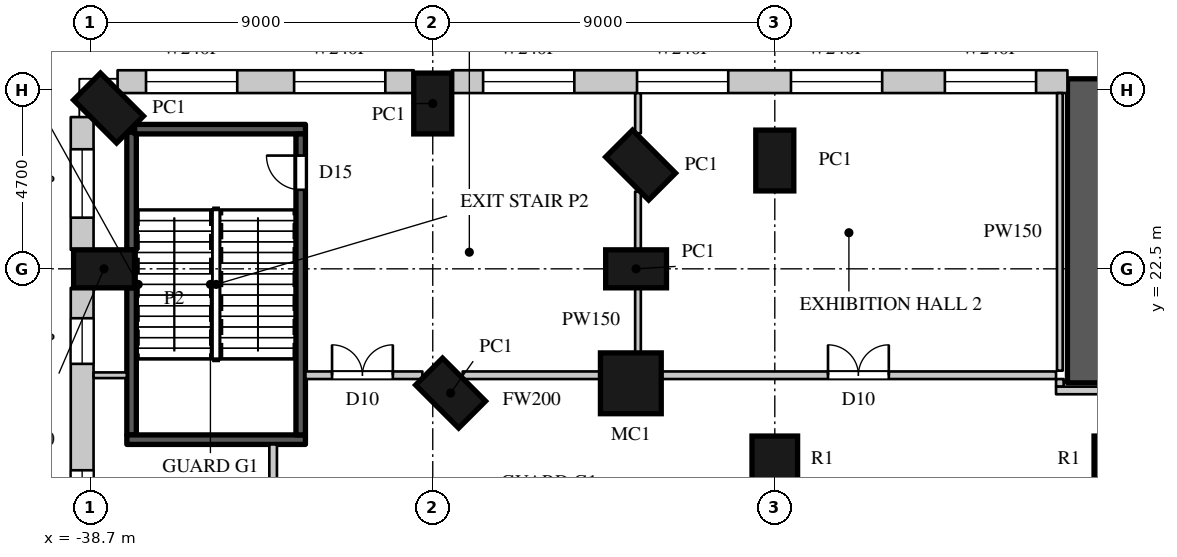
"""IFC4 building model, lengths in metres.
Left out: names, types, materials, properties, quantities, classifications, styles, units other than length and angle.
Written with IfcOpenShell. Run it as: python <this file> out.ifc"""

import sys

from ifc_helpers import new_model, si_unit, direction, frame, frame_2d, origin, origin_2d, place, context, subcontext, project, spatial, rectangle, circle, extrude, element, fill, save


model = new_model("IFC4")
c1 = context("Model", 3, precision=1e-05, world=origin(), true_north=direction((0.0, 1.0)))
c2 = subcontext(c1, "Body", "Model", "MODEL_VIEW")
j1 = project(units=[si_unit("LENGTHUNIT", "METRE"), si_unit("PLANEANGLEUNIT", "RADIAN")], contexts=[c1])
p1 = place(None, origin())
s1 = spatial("IfcSite", under=j1, at=p1, CompositionType="ELEMENT")
p2 = place(p1, origin())
s2 = spatial("IfcBuilding", under=s1, at=p2, CompositionType="ELEMENT")
p3 = place(p2, frame((0.0, 0.0, 9.0)))
s3 = spatial("IfcBuildingStorey", under=s2, at=p3, CompositionType="ELEMENT", Elevation=9.0)
p4 = place(p3, frame((-11.5, 19.5, 0.0), z_axis=(0.0, 0.0, 1.0), x_axis=(0.0, 1.0, 0.0)))
e1 = element("IfcWall", 1, at=p4, inside=s3, PredefinedType="SOLIDWALL", context=c2, shape_type="SweptSolid", body=[
    extrude(rectangle(XDim=8.0, YDim=3.0, at=frame_2d((4.0, 0.0))), origin(), (0.0, 0.0, 1.0), 10.0),
])
for number, where, z_axis, x_axis in (
    (2, (-29.231, 19.231, 0.0), (0.0, 0.0, 1.0), (-0.707, -0.707, 0.0)),
    (3, (-20.7, 25.35, 0.0), (0.0, 0.0, 1.0), (-1.0, 0.0, 0.0)),
    (4, (-24.231, 25.231, 0.0), (0.0, 0.0, 1.0), (-0.707, -0.707, 0.0)),
    (5, (-24.35, 22.5, 0.0), (0.0, 0.0, 1.0), (0.0, -1.0, 0.0)),
):
    element("IfcColumn", number, at=place(p3, frame(where, z_axis=z_axis, x_axis=x_axis)), inside=s3, PredefinedType="COLUMN", context=c2, shape_type="SweptSolid", body=[
        extrude(rectangle(XDim=1.0, YDim=1.6, at=origin_2d()), origin(), (0.0, 0.0, 1.0), 10.0),
    ])
p5 = place(p3, frame((-24.488, 19.488, 0.0), z_axis=(0.0, 0.0, 1.0), x_axis=(1.0, 0.0, 0.0)))
e6 = element("IfcColumn", 6, at=p5, inside=s3, PredefinedType="COLUMN", context=c2, shape_type="SweptSolid", body=[
    extrude(circle(Radius=0.8, at=origin_2d()), origin(), (0.0, 0.0, 1.0), 10.0),
])
for number, where, z_axis, x_axis in (
    (7, (-29.7, 26.85, 0.0), (0.0, 0.0, 1.0), (-1.0, 0.0, 0.0)),
    (8, (-38.231, 26.731, 0.0), (0.0, 0.0, 1.0), (-0.707, -0.707, 0.0)),
    (9, (-38.35, 22.5, 0.0), (0.0, 0.0, 1.0), (0.0, -1.0, 0.0)),
):
    element("IfcColumn", number, at=place(p3, frame(where, z_axis=z_axis, x_axis=x_axis)), inside=s3, PredefinedType="COLUMN", context=c2, shape_type="SweptSolid", body=[
        extrude(rectangle(XDim=1.0, YDim=1.6, at=origin_2d()), origin(), (0.0, 0.0, 1.0), 10.0),
    ])
for number, where, z_axis, x_axis in (
    (10, (-20.7, 17.5, 0.0), (0.0, 0.0, 1.0), (1.0, 0.0, 0.0)),
    (11, (-11.7, 17.5, 0.0), (0.0, 0.0, 1.0), (1.0, 0.0, 0.0)),
):
    element("IfcColumn", number, at=place(p3, frame(where, z_axis=z_axis, x_axis=x_axis)), inside=s3, PredefinedType="COLUMN", context=c2, shape_type="SweptSolid", body=[
        extrude(circle(Radius=0.6, at=origin_2d()), origin(), (0.0, 0.0, 1.0), 10.0),
    ])
p6 = place(p3, frame((-13.0, 27.425, 0.0), z_axis=(0.0, 0.0, 1.0), x_axis=(-1.0, 0.0, 0.0)))
e12 = element("IfcWall", 12, at=p6, inside=s3, PredefinedType="ELEMENTEDWALL", context=c2, shape_type="SweptSolid", body=[
    extrude(rectangle(XDim=16.2, YDim=0.6, at=frame_2d((8.1, 0.0))), origin(), (0.0, 0.0, 1.0), 9.6),
])
p7 = place(p6, frame((0.825, 0.0, 3.0)))
e13 = element("IfcOpeningElement", 13, at=p7, cuts=e12, PredefinedType="OPENING", context=c2, shape_type="SweptSolid", body=[
    extrude(rectangle(XDim=2.4, YDim=2.4, at=frame_2d((1.2, 1.2))), frame((0.0, 0.31, 0.0), z_axis=(0.0, -1.0, 0.0), x_axis=(1.0, 0.0, 0.0)), (0.0, 0.0, 1.0), 0.62),
])
p8 = place(p6, frame((4.875, 0.0, 3.0)))
e14 = element("IfcOpeningElement", 14, at=p8, cuts=e12, PredefinedType="OPENING", context=c2, shape_type="SweptSolid", body=[
    extrude(rectangle(XDim=2.4, YDim=2.4, at=frame_2d((1.2, 1.2))), frame((0.0, 0.31, 0.0), z_axis=(0.0, -1.0, 0.0), x_axis=(1.0, 0.0, 0.0)), (0.0, 0.0, 1.0), 0.62),
])
p9 = place(p6, frame((8.925, 0.0, 3.0)))
e15 = element("IfcOpeningElement", 15, at=p9, cuts=e12, PredefinedType="OPENING", context=c2, shape_type="SweptSolid", body=[
    extrude(rectangle(XDim=2.4, YDim=2.4, at=frame_2d((1.2, 1.2))), frame((0.0, 0.31, 0.0), z_axis=(0.0, -1.0, 0.0), x_axis=(1.0, 0.0, 0.0)), (0.0, 0.0, 1.0), 0.62),
])
p10 = place(p6, frame((12.975, 0.0, 3.0)))
e16 = element("IfcOpeningElement", 16, at=p10, cuts=e12, PredefinedType="OPENING", context=c2, shape_type="SweptSolid", body=[
    extrude(rectangle(XDim=2.4, YDim=2.4, at=frame_2d((1.2, 1.2))), frame((0.0, 0.31, 0.0), z_axis=(0.0, -1.0, 0.0), x_axis=(1.0, 0.0, 0.0)), (0.0, 0.0, 1.0), 0.62),
])
p11 = place(p3, frame((-30.2, 27.425, 0.0), z_axis=(0.0, 0.0, 1.0), x_axis=(-1.0, 0.0, 0.0)))
e17 = element("IfcWall", 17, at=p11, inside=s3, PredefinedType="ELEMENTEDWALL", context=c2, shape_type="SweptSolid", body=[
    extrude(rectangle(XDim=7.793, YDim=0.6, at=frame_2d((3.896, 0.0))), origin(), (0.0, 0.0, 1.0), 9.6),
])
p12 = place(p11, frame((0.748, 0.0, 3.0)))
e18 = element("IfcOpeningElement", 18, at=p12, cuts=e17, PredefinedType="OPENING", context=c2, shape_type="SweptSolid", body=[
    extrude(rectangle(XDim=2.4, YDim=2.4, at=frame_2d((1.2, 1.2))), frame((0.0, 0.31, 0.0), z_axis=(0.0, -1.0, 0.0), x_axis=(1.0, 0.0, 0.0)), (0.0, 0.0, 1.0), 0.62),
])
p13 = place(p11, frame((4.645, 0.0, 3.0)))
e19 = element("IfcOpeningElement", 19, at=p13, cuts=e17, PredefinedType="OPENING", context=c2, shape_type="SweptSolid", body=[
    extrude(rectangle(XDim=2.4, YDim=2.4, at=frame_2d((1.2, 1.2))), frame((0.0, 0.31, 0.0), z_axis=(0.0, -1.0, 0.0), x_axis=(1.0, 0.0, 0.0)), (0.0, 0.0, 1.0), 0.62),
])
p14 = place(p3, frame((-38.925, 26.493, 0.0), z_axis=(0.0, 0.0, 1.0), x_axis=(0.0, -1.0, 0.0)))
e20 = element("IfcWall", 20, at=p14, inside=s3, PredefinedType="ELEMENTEDWALL", context=c2, shape_type="SweptSolid", body=[
    extrude(rectangle(XDim=3.493, YDim=0.6, at=frame_2d((1.747, 0.0))), origin(), (0.0, 0.0, 1.0), 9.6),
])
p15 = place(p14, frame((0.846, 0.0, 3.0)))
e21 = element("IfcOpeningElement", 21, at=p15, cuts=e20, PredefinedType="OPENING", context=c2, shape_type="SweptSolid", body=[
    extrude(rectangle(XDim=1.8, YDim=2.4, at=frame_2d((0.9, 1.2))), frame((0.0, 0.31, 0.0), z_axis=(0.0, -1.0, 0.0), x_axis=(1.0, 0.0, 0.0)), (0.0, 0.0, 1.0), 0.62),
])
p16 = place(p3, frame((-38.925, 22.0, 0.0), z_axis=(0.0, 0.0, 1.0), x_axis=(0.0, -1.0, 0.0)))
e22 = element("IfcWall", 22, at=p16, inside=s3, PredefinedType="ELEMENTEDWALL", context=c2, shape_type="SweptSolid", body=[
    extrude(rectangle(XDim=8.0, YDim=0.6, at=frame_2d((4.0, 0.0))), origin(), (0.0, 0.0, 1.0), 9.6),
])
p17 = place(p16, frame((4.8, 0.0, 3.0)))
e23 = element("IfcOpeningElement", 23, at=p17, cuts=e22, PredefinedType="OPENING", context=c2, shape_type="SweptSolid", body=[
    extrude(rectangle(XDim=2.4, YDim=2.4, at=frame_2d((1.2, 1.2))), frame((0.0, 0.31, 0.0), z_axis=(0.0, -1.0, 0.0), x_axis=(1.0, 0.0, 0.0)), (0.0, 0.0, 1.0), 0.62),
])
p18 = place(p16, frame((0.8, 0.0, 3.0)))
e24 = element("IfcOpeningElement", 24, at=p18, cuts=e22, PredefinedType="OPENING", context=c2, shape_type="SweptSolid", body=[
    extrude(rectangle(XDim=1.2, YDim=2.4, at=frame_2d((0.6, 1.2))), frame((0.0, 0.31, 0.0), z_axis=(0.0, -1.0, 0.0), x_axis=(1.0, 0.0, 0.0)), (0.0, 0.0, 1.0), 0.62),
])
p19 = place(p3, frame((-33.9, -17.88, 0.0), z_axis=(0.0, 0.0, 1.0), x_axis=(0.0, 1.0, 0.0)))
e25 = element("IfcWall", 25, at=p19, inside=s3, PredefinedType="PARTITIONING", context=c2, shape_type="SweptSolid", body=[
    extrude(rectangle(XDim=35.76, YDim=0.2, at=frame_2d((17.88, 0.0))), origin(), (0.0, 0.0, 1.0), 9.598),
])
p20 = place(p19, frame((1.3, 0.0, 0.0)))
e26 = element("IfcOpeningElement", 26, at=p20, cuts=e25, PredefinedType="OPENING", context=c2, shape_type="SweptSolid", body=[
    extrude(rectangle(XDim=0.9, YDim=2.2, at=frame_2d((0.45, 1.1))), frame((0.0, 0.11, 0.0), z_axis=(0.0, -1.0, 0.0), x_axis=(1.0, 0.0, 0.0)), (0.0, 0.0, 1.0), 0.22),
])
p21 = place(p19, frame((5.4, 0.0, 0.0)))
e27 = element("IfcOpeningElement", 27, at=p21, cuts=e25, PredefinedType="OPENING", context=c2, shape_type="SweptSolid", body=[
    extrude(rectangle(XDim=0.9, YDim=2.2, at=frame_2d((0.45, 1.1))), frame((0.0, 0.11, 0.0), z_axis=(0.0, -1.0, 0.0), x_axis=(1.0, 0.0, 0.0)), (0.0, 0.0, 1.0), 0.22),
])
p22 = place(p19, frame((9.65, 0.0, 0.0)))
e28 = element("IfcOpeningElement", 28, at=p22, cuts=e25, PredefinedType="OPENING", context=c2, shape_type="SweptSolid", body=[
    extrude(rectangle(XDim=0.9, YDim=2.2, at=frame_2d((0.45, 1.1))), frame((0.0, 0.11, 0.0), z_axis=(0.0, -1.0, 0.0), x_axis=(1.0, 0.0, 0.0)), (0.0, 0.0, 1.0), 0.22),
])
p23 = place(p19, frame((18.4, 0.0, 0.0)))
e29 = element("IfcOpeningElement", 29, at=p23, cuts=e25, PredefinedType="OPENING", context=c2, shape_type="SweptSolid", body=[
    extrude(rectangle(XDim=0.95, YDim=2.2, at=frame_2d((0.475, 1.1))), frame((0.0, 0.11, 0.0), z_axis=(0.0, -1.0, 0.0), x_axis=(1.0, 0.0, 0.0)), (0.0, 0.0, 1.0), 0.22),
])
p24 = place(p19, frame((28.15, 0.0, 0.0)))
e30 = element("IfcOpeningElement", 30, at=p24, cuts=e25, PredefinedType="OPENING", context=c2, shape_type="SweptSolid", body=[
    extrude(rectangle(XDim=0.95, YDim=2.2, at=frame_2d((0.475, 1.1))), frame((0.0, 0.11, 0.0), z_axis=(0.0, -1.0, 0.0), x_axis=(1.0, 0.0, 0.0)), (0.0, 0.0, 1.0), 0.22),
])
p25 = place(p19, frame((33.0, 0.0, 0.0)))
e31 = element("IfcOpeningElement", 31, at=p25, cuts=e25, PredefinedType="OPENING", context=c2, shape_type="SweptSolid", body=[
    extrude(rectangle(XDim=0.95, YDim=2.2, at=frame_2d((0.475, 1.1))), frame((0.0, 0.11, 0.0), z_axis=(0.0, -1.0, 0.0), x_axis=(1.0, 0.0, 0.0)), (0.0, 0.0, 1.0), 0.22),
])
p26 = place(p3, frame((-33.05, 19.7, 0.0), z_axis=(0.0, 0.0, 1.0), x_axis=(1.0, 0.0, 0.0)))
e32 = element("IfcWall", 32, at=p26, inside=s3, PredefinedType="PARTITIONING", context=c2, shape_type="SweptSolid", body=[
    extrude(rectangle(XDim=3.077, YDim=0.2, at=frame_2d((1.539, 0.0))), origin(), (0.0, 0.0, 1.0), 9.598),
])
p27 = place(p26, frame((0.7, 0.0, 0.0)))
e33 = element("IfcOpeningElement", 33, at=p27, cuts=e32, PredefinedType="OPENING", context=c2, shape_type="SweptSolid", body=[
    extrude(rectangle(XDim=1.6, YDim=2.4, at=frame_2d((0.8, 1.2))), frame((0.0, 0.11, 0.0), z_axis=(0.0, -1.0, 0.0), x_axis=(1.0, 0.0, 0.0)), (0.0, 0.0, 1.0), 0.22),
])
p28 = place(p3, frame((-28.913, 19.7, 0.0), z_axis=(0.0, 0.0, 1.0), x_axis=(1.0, 0.0, 0.0)))
e34 = element("IfcWall", 34, at=p28, inside=s3, PredefinedType="PARTITIONING", context=c2, shape_type="SweptSolid", body=[
    extrude(rectangle(XDim=3.637, YDim=0.2, at=frame_2d((1.819, 0.0))), origin(), (0.0, 0.0, 1.0), 9.598),
])
p29 = place(p3, frame((-23.7, 19.7, 0.0), z_axis=(0.0, 0.0, 1.0), x_axis=(1.0, 0.0, 0.0)))
e35 = element("IfcWall", 35, at=p29, inside=s3, PredefinedType="PARTITIONING", context=c2, shape_type="SweptSolid", body=[
    extrude(rectangle(XDim=10.4, YDim=0.2, at=frame_2d((5.2, 0.0))), origin(), (0.0, 0.0, 1.0), 9.598),
])
p30 = place(p29, frame((4.4, 0.0, 0.0)))
e36 = element("IfcOpeningElement", 36, at=p30, cuts=e35, PredefinedType="OPENING", context=c2, shape_type="SweptSolid", body=[
    extrude(rectangle(XDim=1.6, YDim=2.4, at=frame_2d((0.8, 1.2))), frame((0.0, 0.11, 0.0), z_axis=(0.0, -1.0, 0.0), x_axis=(1.0, 0.0, 0.0)), (0.0, 0.0, 1.0), 0.22),
])
p31 = place(p3, frame((-13.2, 19.4, 0.0), z_axis=(0.0, 0.0, 1.0), x_axis=(0.0, 1.0, 0.0)))
e37 = element("IfcWall", 37, at=p31, inside=s3, PredefinedType="PARTITIONING", context=c2, shape_type="SweptSolid", body=[
    extrude(rectangle(XDim=0.2, YDim=0.2, at=frame_2d((0.1, 0.0))), origin(), (0.0, 0.0, 1.0), 9.598),
])
p32 = place(p3, frame((-13.3, 19.3, 0.0), z_axis=(0.0, 0.0, 1.0), x_axis=(1.0, 0.0, 0.0)))
e38 = element("IfcWall", 38, at=p32, inside=s3, PredefinedType="PARTITIONING", context=c2, shape_type="SweptSolid", body=[
    extrude(rectangle(XDim=2.8, YDim=0.2, at=frame_2d((1.4, 0.0))), origin(), (0.0, 0.0, 1.0), 9.598),
])
p33 = place(p3, frame((-38.625, 19.7, 0.0), z_axis=(0.0, 0.0, 1.0), x_axis=(1.0, 0.0, 0.0)))
e39 = element("IfcWall", 39, at=p33, inside=s3, PredefinedType="PARTITIONING", context=c2, shape_type="SweptSolid", body=[
    extrude(rectangle(XDim=0.875, YDim=0.15, at=frame_2d((0.438, 0.0))), origin(), (0.0, 0.0, 1.0), 9.598),
])
p34 = place(p3, frame((-24.3, 20.273, 0.0), z_axis=(0.0, 0.0, 1.0), x_axis=(0.0, 1.0, 0.0)))
e40 = element("IfcWall", 40, at=p34, inside=s3, PredefinedType="PARTITIONING", context=c2, shape_type="SweptSolid", body=[
    extrude(rectangle(XDim=1.727, YDim=0.15, at=frame_2d((0.864, 0.0))), origin(), (0.0, 0.0, 1.0), 9.598),
])
p35 = place(p3, frame((-24.3, 23.0, 0.0), z_axis=(0.0, 0.0, 1.0), x_axis=(0.0, 1.0, 0.0)))
e41 = element("IfcWall", 41, at=p35, inside=s3, PredefinedType="PARTITIONING", context=c2, shape_type="SweptSolid", body=[
    extrude(rectangle(XDim=1.533, YDim=0.15, at=frame_2d((0.767, 0.0))), origin(), (0.0, 0.0, 1.0), 9.598),
])
p36 = place(p3, frame((-24.3, 26.067, 0.0), z_axis=(0.0, 0.0, 1.0), x_axis=(0.0, 1.0, 0.0)))
e42 = element("IfcWall", 42, at=p36, inside=s3, PredefinedType="PARTITIONING", context=c2, shape_type="SweptSolid", body=[
    extrude(rectangle(XDim=1.058, YDim=0.15, at=frame_2d((0.529, 0.0))), origin(), (0.0, 0.0, 1.0), 9.598),
])
p37 = place(p3, frame((-13.2, 19.82, 0.0), z_axis=(0.0, 0.0, 1.0), x_axis=(0.0, 1.0, 0.0)))
e43 = element("IfcWall", 43, at=p37, inside=s3, PredefinedType="PARTITIONING", context=c2, shape_type="SweptSolid", body=[
    extrude(rectangle(XDim=7.305, YDim=0.15, at=frame_2d((3.652, 0.0))), origin(), (0.0, 0.0, 1.0), 9.598),
])
p38 = place(p3, frame((-37.625, 18.13, 0.0), z_axis=(0.0, 0.0, 1.0), x_axis=(0.0, 1.0, 0.0)))
e44 = element("IfcWall", 44, at=p38, inside=s3, PredefinedType="SHEAR", context=c2, shape_type="SweptSolid", body=[
    extrude(rectangle(XDim=3.87, YDim=0.25, at=frame_2d((1.935, 0.0))), origin(), (0.0, 0.0, 1.0), 9.6),
])
p39 = place(p3, frame((-37.625, 23.0, 0.0), z_axis=(0.0, 0.0, 1.0), x_axis=(0.0, 1.0, 0.0)))
e45 = element("IfcWall", 45, at=p39, inside=s3, PredefinedType="SHEAR", context=c2, shape_type="SweptSolid", body=[
    extrude(rectangle(XDim=3.095, YDim=0.25, at=frame_2d((1.548, 0.0))), origin(), (0.0, 0.0, 1.0), 9.6),
])
p40 = place(p3, frame((-37.75, 18.005, 0.0), z_axis=(0.0, 0.0, 1.0), x_axis=(1.0, 0.0, 0.0)))
e46 = element("IfcWall", 46, at=p40, inside=s3, PredefinedType="SHEAR", context=c2, shape_type="SweptSolid", body=[
    extrude(rectangle(XDim=4.7, YDim=0.25, at=frame_2d((2.35, 0.0))), origin(), (0.0, 0.0, 1.0), 9.6),
])
p41 = place(p3, frame((-37.545, 26.175, 0.0), z_axis=(0.0, 0.0, 1.0), x_axis=(1.0, 0.0, 0.0)))
e47 = element("IfcWall", 47, at=p41, inside=s3, PredefinedType="SHEAR", context=c2, shape_type="SweptSolid", body=[
    extrude(rectangle(XDim=4.495, YDim=0.25, at=frame_2d((2.248, 0.0))), origin(), (0.0, 0.0, 1.0), 9.6),
])
p42 = place(p3, frame((-33.175, 18.13, 0.0), z_axis=(0.0, 0.0, 1.0), x_axis=(0.0, 1.0, 0.0)))
e48 = element("IfcWall", 48, at=p42, inside=s3, PredefinedType="SHEAR", context=c2, shape_type="SweptSolid", body=[
    extrude(rectangle(XDim=7.92, YDim=0.25, at=frame_2d((3.96, 0.0))), origin(), (0.0, 0.0, 1.0), 9.6),
])
p43 = place(p42, frame((6.45, 0.0, 0.0)))
e49 = element("IfcOpeningElement", 49, at=p43, cuts=e48, PredefinedType="OPENING", context=c2, shape_type="SweptSolid", body=[
    extrude(rectangle(XDim=0.9, YDim=2.2, at=frame_2d((0.45, 1.1))), frame((0.0, 0.135, 0.0), z_axis=(0.0, -1.0, 0.0), x_axis=(1.0, 0.0, 0.0)), (0.0, 0.0, 1.0), 0.27),
])
p44 = place(p7, origin())
e50 = element("IfcWindow", 50, at=p44, inside=s3, PartitioningType="SINGLE_PANEL", PredefinedType="WINDOW", context=c2, shape_type="SweptSolid", body=[
    extrude(rectangle(XDim=2.4, YDim=2.4, at=frame_2d((1.2, 1.2))), frame((0.0, 0.06, 0.0), z_axis=(0.0, -1.0, 0.0), x_axis=(1.0, 0.0, 0.0)), (0.0, 0.0, 1.0), 0.06),
])
fill(e13, e50)
p45 = place(p8, origin())
e51 = element("IfcWindow", 51, at=p45, inside=s3, PartitioningType="SINGLE_PANEL", PredefinedType="WINDOW", context=c2, shape_type="SweptSolid", body=[
    extrude(rectangle(XDim=2.4, YDim=2.4, at=frame_2d((1.2, 1.2))), frame((0.0, 0.06, 0.0), z_axis=(0.0, -1.0, 0.0), x_axis=(1.0, 0.0, 0.0)), (0.0, 0.0, 1.0), 0.06),
])
fill(e14, e51)
p46 = place(p9, origin())
e52 = element("IfcWindow", 52, at=p46, inside=s3, PartitioningType="SINGLE_PANEL", PredefinedType="WINDOW", context=c2, shape_type="SweptSolid", body=[
    extrude(rectangle(XDim=2.4, YDim=2.4, at=frame_2d((1.2, 1.2))), frame((0.0, 0.06, 0.0), z_axis=(0.0, -1.0, 0.0), x_axis=(1.0, 0.0, 0.0)), (0.0, 0.0, 1.0), 0.06),
])
fill(e15, e52)
p47 = place(p10, origin())
e53 = element("IfcWindow", 53, at=p47, inside=s3, PartitioningType="SINGLE_PANEL", PredefinedType="WINDOW", context=c2, shape_type="SweptSolid", body=[
    extrude(rectangle(XDim=2.4, YDim=2.4, at=frame_2d((1.2, 1.2))), frame((0.0, 0.06, 0.0), z_axis=(0.0, -1.0, 0.0), x_axis=(1.0, 0.0, 0.0)), (0.0, 0.0, 1.0), 0.06),
])
fill(e16, e53)
p48 = place(p12, origin())
e54 = element("IfcWindow", 54, at=p48, inside=s3, PartitioningType="SINGLE_PANEL", PredefinedType="WINDOW", context=c2, shape_type="SweptSolid", body=[
    extrude(rectangle(XDim=2.4, YDim=2.4, at=frame_2d((1.2, 1.2))), frame((0.0, 0.06, 0.0), z_axis=(0.0, -1.0, 0.0), x_axis=(1.0, 0.0, 0.0)), (0.0, 0.0, 1.0), 0.06),
])
fill(e18, e54)
p49 = place(p13, origin())
e55 = element("IfcWindow", 55, at=p49, inside=s3, PartitioningType="SINGLE_PANEL", PredefinedType="WINDOW", context=c2, shape_type="SweptSolid", body=[
    extrude(rectangle(XDim=2.4, YDim=2.4, at=frame_2d((1.2, 1.2))), frame((0.0, 0.06, 0.0), z_axis=(0.0, -1.0, 0.0), x_axis=(1.0, 0.0, 0.0)), (0.0, 0.0, 1.0), 0.06),
])
fill(e19, e55)
p50 = place(p15, origin())
e56 = element("IfcWindow", 56, at=p50, inside=s3, PartitioningType="SINGLE_PANEL", PredefinedType="WINDOW", context=c2, shape_type="SweptSolid", body=[
    extrude(rectangle(XDim=1.8, YDim=2.4, at=frame_2d((0.9, 1.2))), frame((0.0, 0.06, 0.0), z_axis=(0.0, -1.0, 0.0), x_axis=(1.0, 0.0, 0.0)), (0.0, 0.0, 1.0), 0.06),
])
fill(e21, e56)
p51 = place(p17, origin())
e57 = element("IfcWindow", 57, at=p51, inside=s3, PartitioningType="SINGLE_PANEL", PredefinedType="WINDOW", context=c2, shape_type="SweptSolid", body=[
    extrude(rectangle(XDim=2.4, YDim=2.4, at=frame_2d((1.2, 1.2))), frame((0.0, 0.06, 0.0), z_axis=(0.0, -1.0, 0.0), x_axis=(1.0, 0.0, 0.0)), (0.0, 0.0, 1.0), 0.06),
])
fill(e23, e57)
p52 = place(p27, origin())
e58 = element("IfcDoor", 58, at=p52, inside=s3, OperationType="DOUBLE_DOOR_SINGLE_SWING", PredefinedType="DOOR", context=c2, shape_type="SweptSolid", body=[
    extrude(rectangle(XDim=1.6, YDim=2.4, at=frame_2d((0.8, 1.2))), frame((0.0, 0.025, 0.0), z_axis=(0.0, -1.0, 0.0), x_axis=(1.0, 0.0, 0.0)), (0.0, 0.0, 1.0), 0.05),
])
fill(e33, e58)
p53 = place(p30, origin())
e59 = element("IfcDoor", 59, at=p53, inside=s3, OperationType="DOUBLE_DOOR_SINGLE_SWING", PredefinedType="DOOR", context=c2, shape_type="SweptSolid", body=[
    extrude(rectangle(XDim=1.6, YDim=2.4, at=frame_2d((0.8, 1.2))), frame((0.0, 0.025, 0.0), z_axis=(0.0, -1.0, 0.0), x_axis=(1.0, 0.0, 0.0)), (0.0, 0.0, 1.0), 0.05),
])
fill(e36, e59)
p54 = place(p43, origin())
e60 = element("IfcDoor", 60, at=p54, inside=s3, OperationType="SINGLE_SWING_RIGHT", PredefinedType="DOOR", context=c2, shape_type="SweptSolid", body=[
    extrude(rectangle(XDim=0.9, YDim=2.2, at=frame_2d((0.45, 1.1))), frame((0.0, 0.025, 0.0), z_axis=(0.0, -1.0, 0.0), x_axis=(1.0, 0.0, 0.0)), (0.0, 0.0, 1.0), 0.05),
])
fill(e49, e60)
p55 = place(p18, origin())
e61 = element("IfcWindow", 61, at=p55, inside=s3, PartitioningType="SINGLE_PANEL", PredefinedType="WINDOW", context=c2, shape_type="SweptSolid", body=[
    extrude(rectangle(XDim=1.2, YDim=2.4, at=frame_2d((0.6, 1.2))), frame((0.0, 0.06, 0.0), z_axis=(0.0, -1.0, 0.0), x_axis=(1.0, 0.0, 0.0)), (0.0, 0.0, 1.0), 0.06),
])
fill(e24, e61)
save(model, sys.argv[1])
